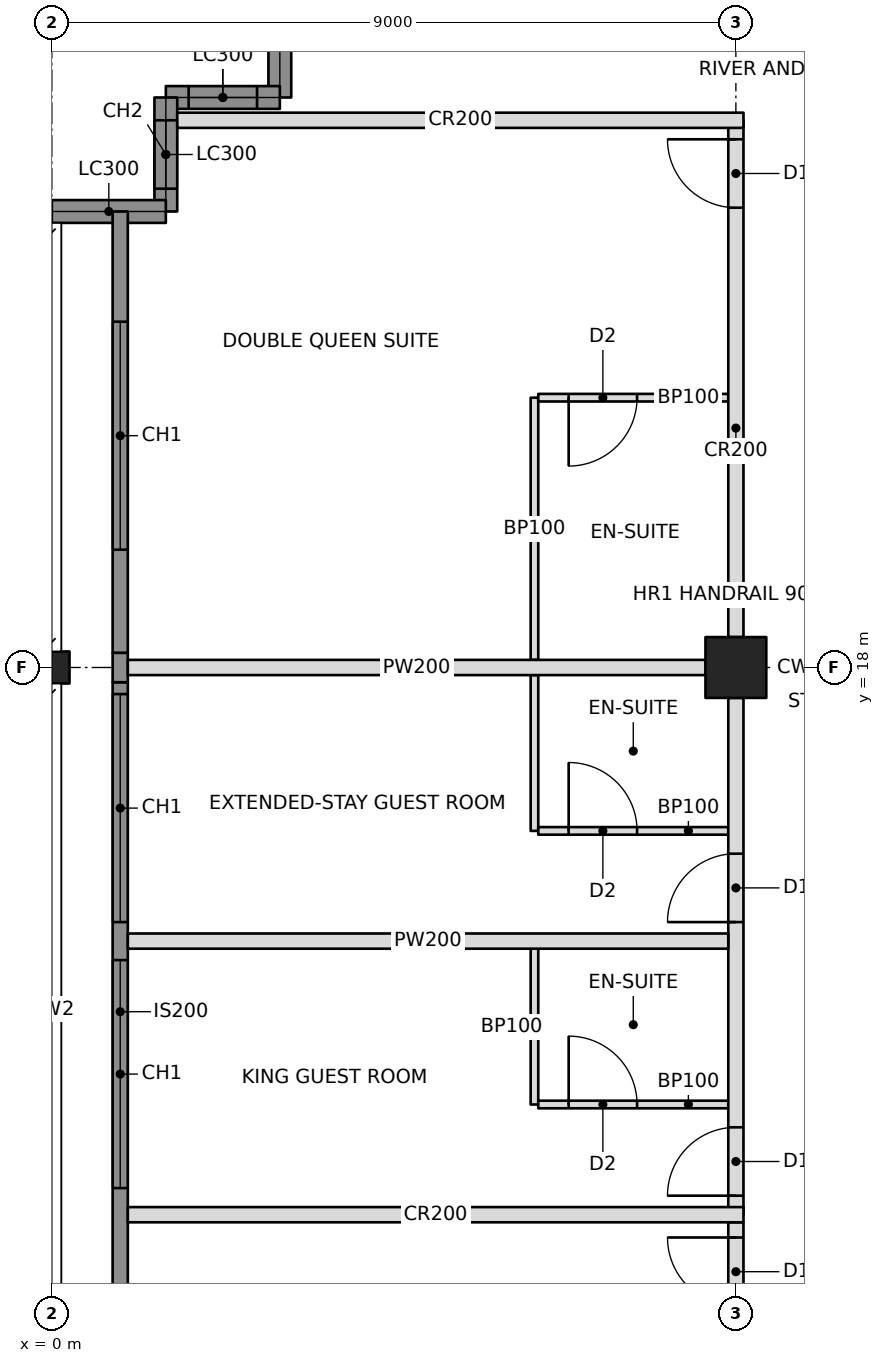
"""IFC4 building model, lengths in metres.
Left out: names, types, materials, properties, quantities, classifications, styles, units other than length and angle.
Written with IfcOpenShell. Run it as: python <this file> out.ifc"""

import sys

from ifc_helpers import new_model, si_unit, direction, frame, frame_2d, origin, origin_2d, place, context, subcontext, project, spatial, rectangle, hollow_rectangle, i_section, extrude, element, fill, save


model = new_model("IFC4")
c1 = context("Model", 3, precision=1e-05, world=origin(), true_north=direction((0.0, 1.0)))
c2 = subcontext(c1, "Body", "Model", "MODEL_VIEW")
j1 = project(units=[si_unit("LENGTHUNIT", "METRE"), si_unit("PLANEANGLEUNIT", "RADIAN")], contexts=[c1])
p1 = place(None, origin())
s1 = spatial("IfcSite", under=j1, at=p1, CompositionType="ELEMENT")
p2 = place(p1, origin())
s2 = spatial("IfcBuilding", under=s1, at=p2, CompositionType="ELEMENT")
p3 = place(p2, frame((0.0, 0.0, 230.2)))
s3 = spatial("IfcBuildingStorey", under=s2, at=p3, CompositionType="ELEMENT", Elevation=230.2)
p4 = place(p3, frame((0.0, 18.0, 0.0), z_axis=(0.0, 0.0, 1.0), x_axis=(0.0, 1.0, 0.0)))
e1 = element("IfcColumn", 1, at=p4, inside=s3, PredefinedType="COLUMN", context=c2, shape_type="SweptSolid", body=[
    extrude(i_section(OverallWidth=0.422, OverallDepth=0.465, WebThickness=0.045, FlangeThickness=0.073, at=origin_2d()), origin(), (0.0, 0.0, 1.0), 3.6),
])
p5 = place(p3, frame((9.0, 18.0, 0.0), z_axis=(0.0, 0.0, 1.0), x_axis=(1.0, 0.0, 0.0)))
e2 = element("IfcColumn", 2, at=p5, inside=s3, PredefinedType="COLUMN", context=c2, shape_type="SweptSolid", body=[
    extrude(hollow_rectangle(XDim=0.8, YDim=0.8, WallThickness=0.1, at=origin_2d()), origin(), (0.0, 0.0, 1.0), 3.6),
])
p6 = place(p3, frame((3.0, 27.0, 0.0), z_axis=(0.0, 0.0, 1.0), x_axis=(0.0, -1.0, 0.0)))
e3 = element("IfcWall", 3, at=p6, inside=s3, PredefinedType="SOLIDWALL", context=c2, shape_type="SweptSolid", body=[
    extrude(rectangle(XDim=1.5, YDim=0.3, at=frame_2d((0.75, 0.0))), origin(), (0.0, 0.0, 1.0), 2.62),
])
p7 = place(p3, frame((3.0, 25.5, 0.0), z_axis=(0.0, 0.0, 1.0), x_axis=(-1.0, 0.0, 0.0)))
e4 = element("IfcWall", 4, at=p7, inside=s3, PredefinedType="SOLIDWALL", context=c2, shape_type="SweptSolid", body=[
    extrude(rectangle(XDim=1.5, YDim=0.3, at=frame_2d((0.75, 0.0))), origin(), (0.0, 0.0, 1.0), 3.4),
])
p8 = place(p7, frame((0.3, 0.0, 0.6)))
e5 = element("IfcOpeningElement", 5, at=p8, cuts=e4, PredefinedType="OPENING", context=c2, shape_type="SweptSolid", body=[
    extrude(rectangle(XDim=0.9, YDim=2.2, at=frame_2d((0.45, 1.1))), frame((0.0, 0.16, 0.0), z_axis=(0.0, -1.0, 0.0), x_axis=(1.0, 0.0, 0.0)), (0.0, 0.0, 1.0), 0.32),
])
p9 = place(p3, frame((1.5, 25.5, 0.0), z_axis=(0.0, 0.0, 1.0), x_axis=(0.0, -1.0, 0.0)))
e6 = element("IfcWall", 6, at=p9, inside=s3, PredefinedType="SOLIDWALL", context=c2, shape_type="SweptSolid", body=[
    extrude(rectangle(XDim=1.5, YDim=0.3, at=frame_2d((0.75, 0.0))), origin(), (0.0, 0.0, 1.0), 3.4),
])
p10 = place(p9, frame((0.3, 0.0, 0.6)))
e7 = element("IfcOpeningElement", 7, at=p10, cuts=e6, PredefinedType="OPENING", context=c2, shape_type="SweptSolid", body=[
    extrude(rectangle(XDim=0.9, YDim=2.2, at=frame_2d((0.45, 1.1))), frame((0.0, 0.16, 0.0), z_axis=(0.0, -1.0, 0.0), x_axis=(1.0, 0.0, 0.0)), (0.0, 0.0, 1.0), 0.32),
])
p11 = place(p3, frame((1.5, 24.0, 0.0), z_axis=(0.0, 0.0, 1.0), x_axis=(-1.0, 0.0, 0.0)))
e8 = element("IfcWall", 8, at=p11, inside=s3, PredefinedType="SOLIDWALL", context=c2, shape_type="SweptSolid", body=[
    extrude(rectangle(XDim=1.5, YDim=0.3, at=frame_2d((0.75, 0.0))), origin(), (0.0, 0.0, 1.0), 2.62),
])
p12 = place(p3, frame((9.0, 10.8, 0.0), z_axis=(0.0, 0.0, 1.0), x_axis=(0.0, 1.0, 0.0)))
e9 = element("IfcWall", 9, at=p12, inside=s3, PredefinedType="PARTITIONING", context=c2, shape_type="SweptSolid", body=[
    extrude(rectangle(XDim=6.8, YDim=0.2, at=frame_2d((3.4, 0.0))), origin(), (0.0, 0.0, 1.0), 2.605),
])
p13 = place(p12, frame((0.25, 0.0, 0.0)))
e10 = element("IfcOpeningElement", 10, at=p13, cuts=e9, PredefinedType="OPENING", context=c2, shape_type="SweptSolid", body=[
    extrude(rectangle(XDim=0.9, YDim=2.1, at=frame_2d((0.45, 1.05))), frame((0.0, 0.11, 0.0), z_axis=(0.0, -1.0, 0.0), x_axis=(1.0, 0.0, 0.0)), (0.0, 0.0, 1.0), 0.22),
])
p14 = place(p12, frame((3.85, 0.0, 0.0)))
e11 = element("IfcOpeningElement", 11, at=p14, cuts=e9, PredefinedType="OPENING", context=c2, shape_type="SweptSolid", body=[
    extrude(rectangle(XDim=0.9, YDim=2.1, at=frame_2d((0.45, 1.05))), frame((0.0, 0.11, 0.0), z_axis=(0.0, -1.0, 0.0), x_axis=(1.0, 0.0, 0.0)), (0.0, 0.0, 1.0), 0.22),
])
p15 = place(p3, frame((9.0, 18.4, 0.0), z_axis=(0.0, 0.0, 1.0), x_axis=(0.0, 1.0, 0.0)))
e12 = element("IfcWall", 12, at=p15, inside=s3, PredefinedType="PARTITIONING", context=c2, shape_type="SweptSolid", body=[
    extrude(rectangle(XDim=6.8, YDim=0.2, at=frame_2d((3.4, 0.0))), origin(), (0.0, 0.0, 1.0), 2.605),
])
p16 = place(p15, frame((5.65, 0.0, 0.0)))
e13 = element("IfcOpeningElement", 13, at=p16, cuts=e12, PredefinedType="OPENING", context=c2, shape_type="SweptSolid", body=[
    extrude(rectangle(XDim=0.9, YDim=2.1, at=frame_2d((0.45, 1.05))), frame((0.0, 0.11, 0.0), z_axis=(0.0, -1.0, 0.0), x_axis=(1.0, 0.0, 0.0)), (0.0, 0.0, 1.0), 0.22),
])
p17 = place(p3, frame((1.0, 10.8, 0.0), z_axis=(0.0, 0.0, 1.0), x_axis=(1.0, 0.0, 0.0)))
e14 = element("IfcWall", 14, at=p17, inside=s3, PredefinedType="PARTITIONING", context=c2, shape_type="SweptSolid", body=[
    extrude(rectangle(XDim=8.1, YDim=0.2, at=frame_2d((4.05, 0.0))), origin(), (0.0, 0.0, 1.0), 2.604),
])
p18 = place(p3, frame((1.65, 25.2, 0.0), z_axis=(0.0, 0.0, 1.0), x_axis=(1.0, 0.0, 0.0)))
e15 = element("IfcWall", 15, at=p18, inside=s3, PredefinedType="PARTITIONING", context=c2, shape_type="SweptSolid", body=[
    extrude(rectangle(XDim=7.45, YDim=0.2, at=frame_2d((3.725, 0.0))), origin(), (0.0, 0.0, 1.0), 2.604),
])
p19 = place(p3, frame((8.9, 14.4, 0.0), z_axis=(0.0, 0.0, 1.0), x_axis=(-1.0, 0.0, 0.0)))
e16 = element("IfcWall", 16, at=p19, inside=s3, PredefinedType="PARTITIONING", context=c2, shape_type="SweptSolid", body=[
    extrude(rectangle(XDim=7.9, YDim=0.2, at=frame_2d((3.95, 0.0))), origin(), (0.0, 0.0, 1.0), 2.604),
])
p20 = place(p3, frame((8.6, 18.0, 0.0), z_axis=(0.0, 0.0, 1.0), x_axis=(-1.0, 0.0, 0.0)))
e17 = element("IfcWall", 17, at=p20, inside=s3, PredefinedType="PARTITIONING", context=c2, shape_type="SweptSolid", body=[
    extrude(rectangle(XDim=7.6, YDim=0.2, at=frame_2d((3.8, 0.0))), origin(), (0.0, 0.0, 1.0), 2.605),
])
p21 = place(p3, frame((6.35, 12.25, 0.0), z_axis=(0.0, 0.0, 1.0), x_axis=(0.0, 1.0, 0.0)))
e18 = element("IfcWall", 18, at=p21, inside=s3, PredefinedType="PARTITIONING", context=c2, shape_type="SweptSolid", body=[
    extrude(rectangle(XDim=2.05, YDim=0.1, at=frame_2d((1.025, 0.0))), origin(), (0.0, 0.0, 1.0), 3.4),
])
p22 = place(p3, frame((8.9, 12.25, 0.0), z_axis=(0.0, 0.0, 1.0), x_axis=(-1.0, 0.0, 0.0)))
e19 = element("IfcWall", 19, at=p22, inside=s3, PredefinedType="PARTITIONING", context=c2, shape_type="SweptSolid", body=[
    extrude(rectangle(XDim=2.5, YDim=0.1, at=frame_2d((1.25, 0.0))), origin(), (0.0, 0.0, 1.0), 2.604),
])
p23 = place(p22, frame((1.2, 0.0, 0.0)))
e20 = element("IfcOpeningElement", 20, at=p23, cuts=e19, PredefinedType="OPENING", context=c2, shape_type="SweptSolid", body=[
    extrude(rectangle(XDim=0.9, YDim=2.1, at=frame_2d((0.45, 1.05))), frame((0.0, 0.06, 0.0), z_axis=(0.0, -1.0, 0.0), x_axis=(1.0, 0.0, 0.0)), (0.0, 0.0, 1.0), 0.12),
])
p24 = place(p3, frame((6.35, 15.85, 0.0), z_axis=(0.0, 0.0, 1.0), x_axis=(0.0, 1.0, 0.0)))
e21 = element("IfcWall", 21, at=p24, inside=s3, PredefinedType="PARTITIONING", context=c2, shape_type="SweptSolid", body=[
    extrude(rectangle(XDim=2.05, YDim=0.1, at=frame_2d((1.025, 0.0))), origin(), (0.0, 0.0, 1.0), 2.604),
])
p25 = place(p3, frame((8.9, 15.85, 0.0), z_axis=(0.0, 0.0, 1.0), x_axis=(-1.0, 0.0, 0.0)))
e22 = element("IfcWall", 22, at=p25, inside=s3, PredefinedType="PARTITIONING", context=c2, shape_type="SweptSolid", body=[
    extrude(rectangle(XDim=2.5, YDim=0.1, at=frame_2d((1.25, 0.0))), origin(), (0.0, 0.0, 1.0), 2.604),
])
p26 = place(p25, frame((1.2, 0.0, 0.0)))
e23 = element("IfcOpeningElement", 23, at=p26, cuts=e22, PredefinedType="OPENING", context=c2, shape_type="SweptSolid", body=[
    extrude(rectangle(XDim=0.9, YDim=2.1, at=frame_2d((0.45, 1.05))), frame((0.0, 0.06, 0.0), z_axis=(0.0, -1.0, 0.0), x_axis=(1.0, 0.0, 0.0)), (0.0, 0.0, 1.0), 0.12),
])
p27 = place(p3, frame((6.35, 18.1, 0.0), z_axis=(0.0, 0.0, 1.0), x_axis=(0.0, 1.0, 0.0)))
e24 = element("IfcWall", 24, at=p27, inside=s3, PredefinedType="PARTITIONING", context=c2, shape_type="SweptSolid", body=[
    extrude(rectangle(XDim=3.45, YDim=0.1, at=frame_2d((1.725, 0.0))), origin(), (0.0, 0.0, 1.0), 2.604),
])
p28 = place(p3, frame((8.9, 21.55, 0.0), z_axis=(0.0, 0.0, 1.0), x_axis=(-1.0, 0.0, 0.0)))
e25 = element("IfcWall", 25, at=p28, inside=s3, PredefinedType="PARTITIONING", context=c2, shape_type="SweptSolid", body=[
    extrude(rectangle(XDim=2.5, YDim=0.1, at=frame_2d((1.25, 0.0))), origin(), (0.0, 0.0, 1.0), 2.604),
])
p29 = place(p28, frame((1.2, 0.0, 0.0)))
e26 = element("IfcOpeningElement", 26, at=p29, cuts=e25, PredefinedType="OPENING", context=c2, shape_type="SweptSolid", body=[
    extrude(rectangle(XDim=0.9, YDim=2.1, at=frame_2d((0.45, 1.05))), frame((0.0, 0.06, 0.0), z_axis=(0.0, -1.0, 0.0), x_axis=(1.0, 0.0, 0.0)), (0.0, 0.0, 1.0), 0.12),
])
p30 = place(p3, frame((9.0, 9.4, 0.0), z_axis=(0.0, 0.0, 1.0), x_axis=(0.0, 1.0, 0.0)))
e27 = element("IfcWall", 27, at=p30, inside=s3, PredefinedType="PARTITIONING", context=c2, shape_type="SweptSolid", body=[
    extrude(rectangle(XDim=1.3, YDim=0.2, at=frame_2d((0.65, 0.0))), origin(), (0.0, 0.0, 1.0), 2.605),
])
p31 = place(p30, frame((0.2, 0.0, 0.0)))
e28 = element("IfcOpeningElement", 28, at=p31, cuts=e27, PredefinedType="OPENING", context=c2, shape_type="SweptSolid", body=[
    extrude(rectangle(XDim=0.9, YDim=2.1, at=frame_2d((0.45, 1.05))), frame((0.0, 0.11, 0.0), z_axis=(0.0, -1.0, 0.0), x_axis=(1.0, 0.0, 0.0)), (0.0, 0.0, 1.0), 0.22),
])
p32 = place(p3, frame((0.9, 9.135, 0.0), z_axis=(0.0, 0.0, 1.0), x_axis=(0.0, 1.0, 0.0)))
e29 = element("IfcWall", 29, at=p32, inside=s3, PredefinedType="SOLIDWALL", context=c2, shape_type="SweptSolid", body=[
    extrude(rectangle(XDim=8.671, YDim=0.2, at=frame_2d((4.335, 0.0))), origin(), (0.0, 0.0, 1.0), 3.4),
])
p33 = place(p32, frame((2.015, 0.0, 0.6)))
e30 = element("IfcOpeningElement", 30, at=p33, cuts=e29, PredefinedType="OPENING", context=c2, shape_type="SweptSolid", body=[
    extrude(rectangle(XDim=3.0, YDim=2.2, at=frame_2d((1.5, 1.1))), frame((0.0, 0.11, 0.0), z_axis=(0.0, -1.0, 0.0), x_axis=(1.0, 0.0, 0.0)), (0.0, 0.0, 1.0), 0.22),
])
p34 = place(p32, frame((5.515, 0.0, 0.6)))
e31 = element("IfcOpeningElement", 31, at=p34, cuts=e29, PredefinedType="OPENING", context=c2, shape_type="SweptSolid", body=[
    extrude(rectangle(XDim=3.0, YDim=2.2, at=frame_2d((1.5, 1.1))), frame((0.0, 0.11, 0.0), z_axis=(0.0, -1.0, 0.0), x_axis=(1.0, 0.0, 0.0)), (0.0, 0.0, 1.0), 0.22),
])
p35 = place(p3, frame((0.9, 17.806, 0.0), z_axis=(0.0, 0.0, 1.0), x_axis=(0.0, 1.0, 0.0)))
e32 = element("IfcWall", 32, at=p35, inside=s3, PredefinedType="SOLIDWALL", context=c2, shape_type="SweptSolid", body=[
    extrude(rectangle(XDim=0.388, YDim=0.2, at=frame_2d((0.194, 0.0))), origin(), (0.0, 0.0, 1.0), 2.604),
])
p36 = place(p3, frame((0.9, 18.194, 0.0), z_axis=(0.0, 0.0, 1.0), x_axis=(0.0, 1.0, 0.0)))
e33 = element("IfcWall", 33, at=p36, inside=s3, PredefinedType="SOLIDWALL", context=c2, shape_type="SweptSolid", body=[
    extrude(rectangle(XDim=5.806, YDim=0.2, at=frame_2d((2.903, 0.0))), origin(), (0.0, 0.0, 1.0), 3.4),
])
p37 = place(p36, frame((1.356, 0.0, 0.6)))
e34 = element("IfcOpeningElement", 34, at=p37, cuts=e33, PredefinedType="OPENING", context=c2, shape_type="SweptSolid", body=[
    extrude(rectangle(XDim=3.0, YDim=2.2, at=frame_2d((1.5, 1.1))), frame((0.0, 0.11, 0.0), z_axis=(0.0, -1.0, 0.0), x_axis=(1.0, 0.0, 0.0)), (0.0, 0.0, 1.0), 0.22),
])
p38 = place(p8, origin())
e35 = element("IfcWindow", 35, at=p38, inside=s3, PartitioningType="SINGLE_PANEL", PredefinedType="WINDOW", context=c2, shape_type="SweptSolid", body=[
    extrude(rectangle(XDim=0.9, YDim=2.2, at=frame_2d((0.45, 1.1))), frame((0.0, 0.03, 0.0), z_axis=(0.0, -1.0, 0.0), x_axis=(1.0, 0.0, 0.0)), (0.0, 0.0, 1.0), 0.06),
])
fill(e5, e35)
p39 = place(p10, origin())
e36 = element("IfcWindow", 36, at=p39, inside=s3, PartitioningType="SINGLE_PANEL", PredefinedType="WINDOW", context=c2, shape_type="SweptSolid", body=[
    extrude(rectangle(XDim=0.9, YDim=2.2, at=frame_2d((0.45, 1.1))), frame((0.0, 0.03, 0.0), z_axis=(0.0, -1.0, 0.0), x_axis=(1.0, 0.0, 0.0)), (0.0, 0.0, 1.0), 0.06),
])
fill(e7, e36)
p40 = place(p33, origin())
e37 = element("IfcWindow", 37, at=p40, inside=s3, PartitioningType="TRIPLE_PANEL_VERTICAL", PredefinedType="WINDOW", context=c2, shape_type="SweptSolid", body=[
    extrude(rectangle(XDim=3.0, YDim=2.2, at=frame_2d((1.5, 1.1))), frame((0.0, 0.03, 0.0), z_axis=(0.0, -1.0, 0.0), x_axis=(1.0, 0.0, 0.0)), (0.0, 0.0, 1.0), 0.06),
])
fill(e30, e37)
p41 = place(p34, origin())
e38 = element("IfcWindow", 38, at=p41, inside=s3, PartitioningType="TRIPLE_PANEL_VERTICAL", PredefinedType="WINDOW", context=c2, shape_type="SweptSolid", body=[
    extrude(rectangle(XDim=3.0, YDim=2.2, at=frame_2d((1.5, 1.1))), frame((0.0, 0.03, 0.0), z_axis=(0.0, -1.0, 0.0), x_axis=(1.0, 0.0, 0.0)), (0.0, 0.0, 1.0), 0.06),
])
fill(e31, e38)
p42 = place(p37, origin())
e39 = element("IfcWindow", 39, at=p42, inside=s3, PartitioningType="TRIPLE_PANEL_VERTICAL", PredefinedType="WINDOW", context=c2, shape_type="SweptSolid", body=[
    extrude(rectangle(XDim=3.0, YDim=2.2, at=frame_2d((1.5, 1.1))), frame((0.0, 0.03, 0.0), z_axis=(0.0, -1.0, 0.0), x_axis=(1.0, 0.0, 0.0)), (0.0, 0.0, 1.0), 0.06),
])
fill(e34, e39)
p43 = place(p23, frame((0.9, 0.0, 0.0), z_axis=(0.0, 0.0, 1.0), x_axis=(-1.0, 0.0, 0.0)))
e40 = element("IfcDoor", 40, at=p43, inside=s3, OperationType="SINGLE_SWING_LEFT", PredefinedType="DOOR", context=c2, shape_type="SweptSolid", body=[
    extrude(rectangle(XDim=0.9, YDim=2.1, at=frame_2d((0.45, 1.05))), frame((0.0, 0.025, 0.0), z_axis=(0.0, -1.0, 0.0), x_axis=(1.0, 0.0, 0.0)), (0.0, 0.0, 1.0), 0.05),
])
fill(e20, e40)
p44 = place(p13, origin())
e41 = element("IfcDoor", 41, at=p44, inside=s3, OperationType="SINGLE_SWING_LEFT", PredefinedType="DOOR", context=c2, shape_type="SweptSolid", body=[
    extrude(rectangle(XDim=0.9, YDim=2.1, at=frame_2d((0.45, 1.05))), frame((0.0, 0.025, 0.0), z_axis=(0.0, -1.0, 0.0), x_axis=(1.0, 0.0, 0.0)), (0.0, 0.0, 1.0), 0.05),
])
fill(e10, e41)
p45 = place(p26, frame((0.9, 0.0, 0.0), z_axis=(0.0, 0.0, 1.0), x_axis=(-1.0, 0.0, 0.0)))
e42 = element("IfcDoor", 42, at=p45, inside=s3, OperationType="SINGLE_SWING_LEFT", PredefinedType="DOOR", context=c2, shape_type="SweptSolid", body=[
    extrude(rectangle(XDim=0.9, YDim=2.1, at=frame_2d((0.45, 1.05))), frame((0.0, 0.025, 0.0), z_axis=(0.0, -1.0, 0.0), x_axis=(1.0, 0.0, 0.0)), (0.0, 0.0, 1.0), 0.05),
])
fill(e23, e42)
p46 = place(p14, origin())
e43 = element("IfcDoor", 43, at=p46, inside=s3, OperationType="SINGLE_SWING_LEFT", PredefinedType="DOOR", context=c2, shape_type="SweptSolid", body=[
    extrude(rectangle(XDim=0.9, YDim=2.1, at=frame_2d((0.45, 1.05))), frame((0.0, 0.025, 0.0), z_axis=(0.0, -1.0, 0.0), x_axis=(1.0, 0.0, 0.0)), (0.0, 0.0, 1.0), 0.05),
])
fill(e11, e43)
p47 = place(p29, origin())
e44 = element("IfcDoor", 44, at=p47, inside=s3, OperationType="SINGLE_SWING_RIGHT", PredefinedType="DOOR", context=c2, shape_type="SweptSolid", body=[
    extrude(rectangle(XDim=0.9, YDim=2.1, at=frame_2d((0.45, 1.05))), frame((0.0, 0.025, 0.0), z_axis=(0.0, -1.0, 0.0), x_axis=(1.0, 0.0, 0.0)), (0.0, 0.0, 1.0), 0.05),
])
fill(e26, e44)
p48 = place(p16, origin())
e45 = element("IfcDoor", 45, at=p48, inside=s3, OperationType="SINGLE_SWING_RIGHT", PredefinedType="DOOR", context=c2, shape_type="SweptSolid", body=[
    extrude(rectangle(XDim=0.9, YDim=2.1, at=frame_2d((0.45, 1.05))), frame((0.0, 0.025, 0.0), z_axis=(0.0, -1.0, 0.0), x_axis=(1.0, 0.0, 0.0)), (0.0, 0.0, 1.0), 0.05),
])
fill(e13, e45)
p49 = place(p31, origin())
e46 = element("IfcDoor", 46, at=p49, inside=s3, OperationType="SINGLE_SWING_RIGHT", PredefinedType="DOOR", context=c2, shape_type="SweptSolid", body=[
    extrude(rectangle(XDim=0.9, YDim=2.1, at=frame_2d((0.45, 1.05))), frame((0.0, 0.025, 0.0), z_axis=(0.0, -1.0, 0.0), x_axis=(1.0, 0.0, 0.0)), (0.0, 0.0, 1.0), 0.05),
])
fill(e28, e46)
save(model, sys.argv[1])
